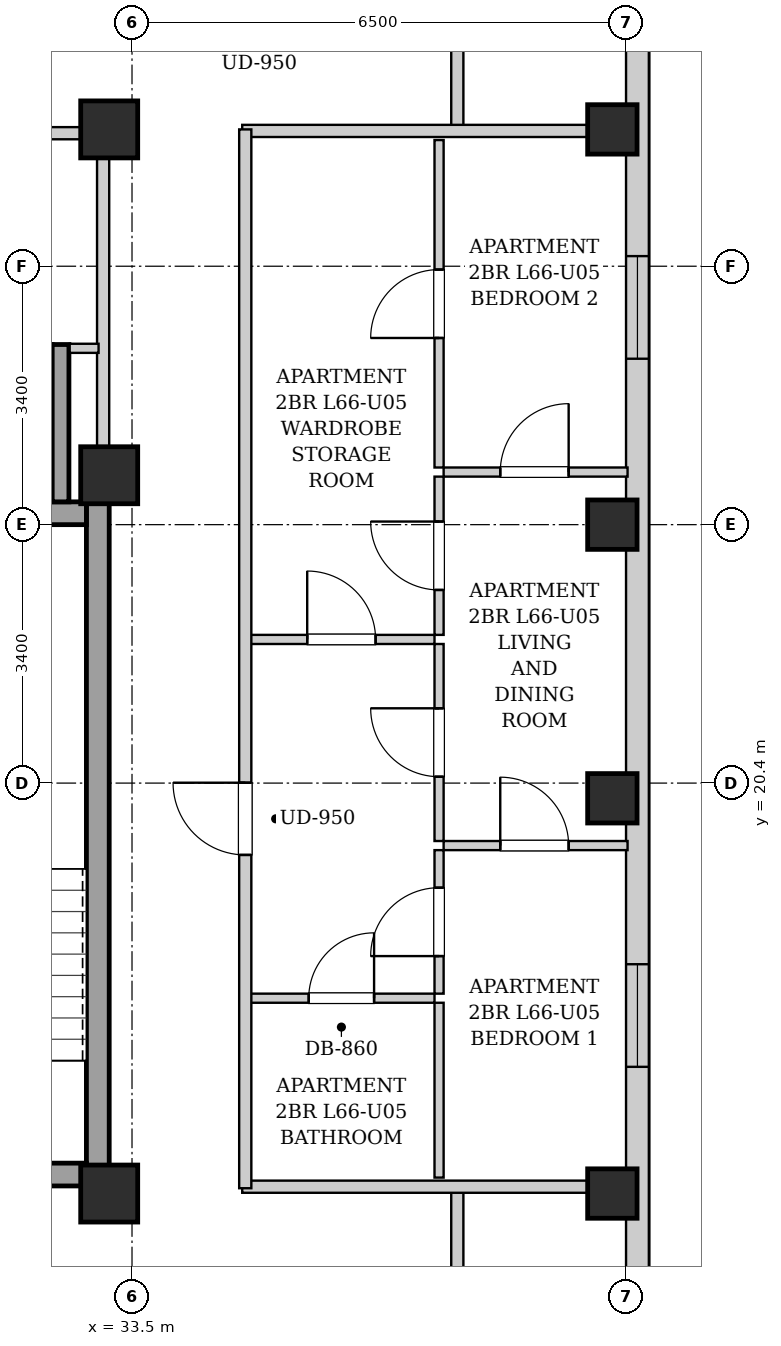
"""IFC4 building model, lengths in metres.
Left out: names, types, materials, properties, quantities, classifications, styles, units other than length and angle.
Written with IfcOpenShell. Run it as: python <this file> out.ifc"""

import sys

from ifc_helpers import new_model, si_unit, direction, frame, frame_2d, origin, origin_2d, place, context, subcontext, project, spatial, rectangle, extrude, element, fill, save


model = new_model("IFC4")
c1 = context("Model", 3, precision=1e-05, world=origin(), true_north=direction((0.0, 1.0)))
c2 = subcontext(c1, "Body", "Model", "MODEL_VIEW")
j1 = project(units=[si_unit("LENGTHUNIT", "METRE"), si_unit("PLANEANGLEUNIT", "RADIAN")], contexts=[c1])
p1 = place(None, origin())
s1 = spatial("IfcSite", under=j1, at=p1, CompositionType="ELEMENT")
p2 = place(p1, origin())
s2 = spatial("IfcBuilding", under=s1, at=p2, CompositionType="ELEMENT")
p3 = place(p2, frame((0.0, 0.0, 227.5)))
s3 = spatial("IfcBuildingStorey", under=s2, at=p3, CompositionType="ELEMENT", Elevation=227.5)
for number, where, z_axis, x_axis in (
    (1, (39.82, 15.0, 0.0), (0.0, 0.0, 1.0), (1.0, 0.0, 0.0)),
    (2, (39.82, 20.2, 0.0), (0.0, 0.0, 1.0), (1.0, 0.0, 0.0)),
    (3, (39.82, 23.8, 0.0), (0.0, 0.0, 1.0), (1.0, 0.0, 0.0)),
    (4, (39.82, 29.0, 0.0), (0.0, 0.0, 1.0), (1.0, 0.0, 0.0)),
):
    element("IfcColumn", number, at=place(p3, frame(where, z_axis=z_axis, x_axis=x_axis)), inside=s3, PredefinedType="COLUMN", context=c2, shape_type="SweptSolid", body=[
        extrude(rectangle(XDim=0.65, YDim=0.65, at=origin_2d()), origin(), (0.0, 0.0, 1.0), 3.4),
    ])
for number, where, z_axis, x_axis in (
    (5, (33.2, 15.0, 0.0), (0.0, 0.0, 1.0), (1.0, 0.0, 0.0)),
    (6, (33.2, 29.0, 0.0), (0.0, 0.0, 1.0), (1.0, 0.0, 0.0)),
    (7, (33.2, 24.45, 0.0), (0.0, 0.0, 1.0), (1.0, 0.0, 0.0)),
):
    element("IfcColumn", number, at=place(p3, frame(where, z_axis=z_axis, x_axis=x_axis)), inside=s3, PredefinedType="COLUMN", context=c2, shape_type="SweptSolid", body=[
        extrude(rectangle(XDim=0.75, YDim=0.75, at=origin_2d()), origin(), (0.0, 0.0, 1.0), 3.4),
    ])
p4 = place(p3, frame((40.15, 37.7, 0.0), z_axis=(0.0, 0.0, 1.0), x_axis=(0.0, -1.0, 0.0)))
e8 = element("IfcWall", 8, at=p4, inside=s3, PredefinedType="SOLIDWALL", context=c2, shape_type="SweptSolid", body=[
    extrude(rectangle(XDim=31.4, YDim=0.3, at=frame_2d((15.7, 0.0))), origin(), (0.0, 0.0, 1.0), 3.14),
])
p5 = place(p4, frame((28.396, 0.0, 0.55)))
e9 = element("IfcOpeningElement", 9, at=p5, cuts=e8, PredefinedType="OPENING", context=c2, shape_type="SweptSolid", body=[
    extrude(rectangle(XDim=1.35, YDim=1.2, at=frame_2d((0.675, 0.6))), frame((0.0, 0.16, 0.0), z_axis=(0.0, -1.0, 0.0), x_axis=(1.0, 0.0, 0.0)), (0.0, 0.0, 1.0), 0.32),
])
p6 = place(p4, frame((1.653, 0.0, 0.55)))
e10 = element("IfcOpeningElement", 10, at=p6, cuts=e8, PredefinedType="OPENING", context=c2, shape_type="SweptSolid", body=[
    extrude(rectangle(XDim=1.35, YDim=1.2, at=frame_2d((0.675, 0.6))), frame((0.0, 0.16, 0.0), z_axis=(0.0, -1.0, 0.0), x_axis=(1.0, 0.0, 0.0)), (0.0, 0.0, 1.0), 0.32),
])
p7 = place(p4, frame((19.683, 0.0, 0.55)))
e11 = element("IfcOpeningElement", 11, at=p7, cuts=e8, PredefinedType="OPENING", context=c2, shape_type="SweptSolid", body=[
    extrude(rectangle(XDim=1.35, YDim=1.2, at=frame_2d((0.675, 0.6))), frame((0.0, 0.16, 0.0), z_axis=(0.0, -1.0, 0.0), x_axis=(1.0, 0.0, 0.0)), (0.0, 0.0, 1.0), 0.32),
])
p8 = place(p4, frame((10.367, 0.0, 0.55)))
e12 = element("IfcOpeningElement", 12, at=p8, cuts=e8, PredefinedType="OPENING", context=c2, shape_type="SweptSolid", body=[
    extrude(rectangle(XDim=1.35, YDim=1.2, at=frame_2d((0.675, 0.6))), frame((0.0, 0.16, 0.0), z_axis=(0.0, -1.0, 0.0), x_axis=(1.0, 0.0, 0.0)), (0.0, 0.0, 1.0), 0.32),
])
p9 = place(p3, frame((33.05, 15.1, 0.0), z_axis=(0.0, 0.0, 1.0), x_axis=(0.0, 1.0, 0.0)))
e13 = element("IfcWall", 13, at=p9, inside=s3, PredefinedType="SHEAR", context=c2, shape_type="SweptSolid", body=[
    extrude(rectangle(XDim=9.0, YDim=0.3, at=frame_2d((4.5, 0.0))), origin(), (0.0, 0.0, 1.0), 3.14),
])
p10 = place(p3, frame((30.05, 23.95, 0.0), z_axis=(0.0, 0.0, 1.0), x_axis=(1.0, 0.0, 0.0)))
e14 = element("IfcWall", 14, at=p10, inside=s3, PredefinedType="SHEAR", context=c2, shape_type="SweptSolid", body=[
    extrude(rectangle(XDim=2.85, YDim=0.3, at=frame_2d((1.425, 0.0))), origin(), (0.0, 0.0, 1.0), 3.14),
])
p11 = place(p3, frame((30.05, 15.25, 0.0), z_axis=(0.0, 0.0, 1.0), x_axis=(1.0, 0.0, 0.0)))
e15 = element("IfcWall", 15, at=p11, inside=s3, PredefinedType="SHEAR", context=c2, shape_type="SweptSolid", body=[
    extrude(rectangle(XDim=2.85, YDim=0.3, at=frame_2d((1.425, 0.0))), origin(), (0.0, 0.0, 1.0), 3.14),
])
p12 = place(p11, frame((0.86, 0.0, 0.0)))
e16 = element("IfcOpeningElement", 16, at=p12, cuts=e15, PredefinedType="OPENING", context=c2, shape_type="SweptSolid", body=[
    extrude(rectangle(XDim=1.1, YDim=2.05, at=frame_2d((0.55, 1.025))), frame((0.0, 0.16, 0.0), z_axis=(0.0, -1.0, 0.0), x_axis=(1.0, 0.0, 0.0)), (0.0, 0.0, 1.0), 0.32),
])
p13 = place(p3, frame((32.56, 24.1, 0.0), z_axis=(0.0, 0.0, 1.0), x_axis=(0.0, 1.0, 0.0)))
e17 = element("IfcWall", 17, at=p13, inside=s3, PredefinedType="SHEAR", context=c2, shape_type="SweptSolid", body=[
    extrude(rectangle(XDim=2.07, YDim=0.22, at=frame_2d((1.035, 0.0))), origin(), (0.0, 0.0, 1.0), 3.14),
])
p14 = place(p3, frame((33.12, 24.12, 0.0), z_axis=(0.0, 0.0, 1.0), x_axis=(0.0, 1.0, 0.0)))
e18 = element("IfcWall", 18, at=p14, inside=s3, PredefinedType="PARTITIONING", context=c2, shape_type="SweptSolid", body=[
    extrude(rectangle(XDim=4.76, YDim=0.16, at=frame_2d((2.38, 0.0))), origin(), (0.0, 0.0, 1.0), 2.475),
])
p15 = place(p3, frame((32.68, 26.12, 0.0), z_axis=(0.0, 0.0, 1.0), x_axis=(1.0, 0.0, 0.0)))
e19 = element("IfcWall", 19, at=p15, inside=s3, PredefinedType="PARTITIONING", context=c2, shape_type="SweptSolid", body=[
    extrude(rectangle(XDim=0.38, YDim=0.12, at=frame_2d((0.19, 0.0))), origin(), (0.0, 0.0, 1.0), 3.14),
])
p16 = place(p3, frame((30.08, 28.95, 0.0), z_axis=(0.0, 0.0, 1.0), x_axis=(1.0, 0.0, 0.0)))
e20 = element("IfcWall", 20, at=p16, inside=s3, PredefinedType="PARTITIONING", context=c2, shape_type="SweptSolid", body=[
    extrude(rectangle(XDim=2.96, YDim=0.16, at=frame_2d((1.48, 0.0))), origin(), (0.0, 0.0, 1.0), 3.14),
])
p17 = place(p16, frame((1.045, 0.0, 0.0)))
e21 = element("IfcOpeningElement", 21, at=p17, cuts=e20, PredefinedType="OPENING", context=c2, shape_type="SweptSolid", body=[
    extrude(rectangle(XDim=0.86, YDim=2.05, at=frame_2d((0.43, 1.025))), frame((0.0, 0.09, 0.0), z_axis=(0.0, -1.0, 0.0), x_axis=(1.0, 0.0, 0.0)), (0.0, 0.0, 1.0), 0.18),
])
for number, where, z_axis, x_axis in (
    (22, (37.78, 13.51, 0.0), (0.0, 0.0, 1.0), (0.0, 1.0, 0.0)),
    (23, (37.78, 28.98, 0.0), (0.0, 0.0, 1.0), (0.0, 1.0, 0.0)),
):
    element("IfcWall", number, at=place(p3, frame(where, z_axis=z_axis, x_axis=x_axis)), inside=s3, PredefinedType="PARTITIONING", context=c2, shape_type="SweptSolid", body=[
        extrude(rectangle(XDim=1.58, YDim=0.16, at=frame_2d((0.79, 0.0))), origin(), (0.0, 0.0, 1.0), 3.14),
    ])
for number, where, z_axis, x_axis in (
    (24, (34.95, 15.09, 0.0), (0.0, 0.0, 1.0), (1.0, 0.0, 0.0)),
    (25, (34.95, 28.98, 0.0), (0.0, 0.0, 1.0), (1.0, 0.0, 0.0)),
):
    element("IfcWall", number, at=place(p3, frame(where, z_axis=z_axis, x_axis=x_axis)), inside=s3, PredefinedType="PARTITIONING", context=c2, shape_type="SweptSolid", body=[
        extrude(rectangle(XDim=5.07, YDim=0.16, at=frame_2d((2.535, 0.0))), origin(), (0.0, 0.0, 1.0), 2.668),
    ])
p18 = place(p3, frame((35.03, 22.29, 0.0), z_axis=(0.0, 0.0, 1.0), x_axis=(1.0, 0.0, 0.0)))
e26 = element("IfcWall", 26, at=p18, inside=s3, PredefinedType="PARTITIONING", context=c2, shape_type="SweptSolid", body=[
    extrude(rectangle(XDim=2.45, YDim=0.12, at=frame_2d((1.225, 0.0))), origin(), (0.0, 0.0, 1.0), 3.14),
])
p19 = place(p18, frame((0.775, 0.0, 0.0)))
e27 = element("IfcOpeningElement", 27, at=p19, cuts=e26, PredefinedType="OPENING", context=c2, shape_type="SweptSolid", body=[
    extrude(rectangle(XDim=0.9, YDim=2.05, at=frame_2d((0.45, 1.025))), frame((0.0, 0.07, 0.0), z_axis=(0.0, -1.0, 0.0), x_axis=(1.0, 0.0, 0.0)), (0.0, 0.0, 1.0), 0.14),
])
p20 = place(p3, frame((37.54, 22.35, 0.0), z_axis=(0.0, 0.0, 1.0), x_axis=(0.0, 1.0, 0.0)))
e28 = element("IfcWall", 28, at=p20, inside=s3, PredefinedType="PARTITIONING", context=c2, shape_type="SweptSolid", body=[
    extrude(rectangle(XDim=2.082, YDim=0.12, at=frame_2d((1.041, 0.0))), origin(), (0.0, 0.0, 1.0), 3.14),
])
p21 = place(p20, frame((0.591, 0.0, 0.0)))
e29 = element("IfcOpeningElement", 29, at=p21, cuts=e28, PredefinedType="OPENING", context=c2, shape_type="SweptSolid", body=[
    extrude(rectangle(XDim=0.9, YDim=2.05, at=frame_2d((0.45, 1.025))), frame((0.0, 0.07, 0.0), z_axis=(0.0, -1.0, 0.0), x_axis=(1.0, 0.0, 0.0)), (0.0, 0.0, 1.0), 0.14),
])
p22 = place(p3, frame((37.54, 24.552, 0.0), z_axis=(0.0, 0.0, 1.0), x_axis=(0.0, 1.0, 0.0)))
e30 = element("IfcWall", 30, at=p22, inside=s3, PredefinedType="PARTITIONING", context=c2, shape_type="SweptSolid", body=[
    extrude(rectangle(XDim=4.308, YDim=0.12, at=frame_2d((2.154, 0.0))), origin(), (0.0, 0.0, 1.0), 3.14),
])
p23 = place(p22, frame((1.704, 0.0, 0.0)))
e31 = element("IfcOpeningElement", 31, at=p23, cuts=e30, PredefinedType="OPENING", context=c2, shape_type="SweptSolid", body=[
    extrude(rectangle(XDim=0.9, YDim=2.05, at=frame_2d((0.45, 1.025))), frame((0.0, 0.07, 0.0), z_axis=(0.0, -1.0, 0.0), x_axis=(1.0, 0.0, 0.0)), (0.0, 0.0, 1.0), 0.14),
])
p24 = place(p3, frame((35.03, 17.57, 0.0), z_axis=(0.0, 0.0, 1.0), x_axis=(1.0, 0.0, 0.0)))
e32 = element("IfcWall", 32, at=p24, inside=s3, PredefinedType="PARTITIONING", context=c2, shape_type="SweptSolid", body=[
    extrude(rectangle(XDim=2.45, YDim=0.12, at=frame_2d((1.225, 0.0))), origin(), (0.0, 0.0, 1.0), 3.14),
])
p25 = place(p24, frame((0.795, 0.0, 0.0)))
e33 = element("IfcOpeningElement", 33, at=p25, cuts=e32, PredefinedType="OPENING", context=c2, shape_type="SweptSolid", body=[
    extrude(rectangle(XDim=0.86, YDim=2.05, at=frame_2d((0.43, 1.025))), frame((0.0, 0.07, 0.0), z_axis=(0.0, -1.0, 0.0), x_axis=(1.0, 0.0, 0.0)), (0.0, 0.0, 1.0), 0.14),
])
p26 = place(p3, frame((37.54, 15.21, 0.0), z_axis=(0.0, 0.0, 1.0), x_axis=(0.0, 1.0, 0.0)))
e34 = element("IfcWall", 34, at=p26, inside=s3, PredefinedType="PARTITIONING", context=c2, shape_type="SweptSolid", body=[
    extrude(rectangle(XDim=2.3, YDim=0.12, at=frame_2d((1.15, 0.0))), origin(), (0.0, 0.0, 1.0), 3.14),
])
p27 = place(p3, frame((37.54, 17.63, 0.0), z_axis=(0.0, 0.0, 1.0), x_axis=(0.0, 1.0, 0.0)))
e35 = element("IfcWall", 35, at=p27, inside=s3, PredefinedType="PARTITIONING", context=c2, shape_type="SweptSolid", body=[
    extrude(rectangle(XDim=1.888, YDim=0.12, at=frame_2d((0.944, 0.0))), origin(), (0.0, 0.0, 1.0), 3.14),
])
p28 = place(p27, frame((0.494, 0.0, 0.0)))
e36 = element("IfcOpeningElement", 36, at=p28, cuts=e35, PredefinedType="OPENING", context=c2, shape_type="SweptSolid", body=[
    extrude(rectangle(XDim=0.9, YDim=2.05, at=frame_2d((0.45, 1.025))), frame((0.0, 0.07, 0.0), z_axis=(0.0, -1.0, 0.0), x_axis=(1.0, 0.0, 0.0)), (0.0, 0.0, 1.0), 0.14),
])
p29 = place(p3, frame((37.54, 19.638, 0.0), z_axis=(0.0, 0.0, 1.0), x_axis=(0.0, 1.0, 0.0)))
e37 = element("IfcWall", 37, at=p29, inside=s3, PredefinedType="PARTITIONING", context=c2, shape_type="SweptSolid", body=[
    extrude(rectangle(XDim=2.592, YDim=0.12, at=frame_2d((1.296, 0.0))), origin(), (0.0, 0.0, 1.0), 3.14),
])
p30 = place(p29, frame((0.846, 0.0, 0.0)))
e38 = element("IfcOpeningElement", 38, at=p30, cuts=e37, PredefinedType="OPENING", context=c2, shape_type="SweptSolid", body=[
    extrude(rectangle(XDim=0.9, YDim=2.05, at=frame_2d((0.45, 1.025))), frame((0.0, 0.07, 0.0), z_axis=(0.0, -1.0, 0.0), x_axis=(1.0, 0.0, 0.0)), (0.0, 0.0, 1.0), 0.14),
])
p31 = place(p3, frame((37.6, 19.578, 0.0), z_axis=(0.0, 0.0, 1.0), x_axis=(1.0, 0.0, 0.0)))
e39 = element("IfcWall", 39, at=p31, inside=s3, PredefinedType="PARTITIONING", context=c2, shape_type="SweptSolid", body=[
    extrude(rectangle(XDim=2.42, YDim=0.12, at=frame_2d((1.21, 0.0))), origin(), (0.0, 0.0, 1.0), 3.14),
])
p32 = place(p31, frame((0.745, 0.0, 0.0)))
e40 = element("IfcOpeningElement", 40, at=p32, cuts=e39, PredefinedType="OPENING", context=c2, shape_type="SweptSolid", body=[
    extrude(rectangle(XDim=0.9, YDim=2.05, at=frame_2d((0.45, 1.025))), frame((0.0, 0.07, 0.0), z_axis=(0.0, -1.0, 0.0), x_axis=(1.0, 0.0, 0.0)), (0.0, 0.0, 1.0), 0.14),
])
p33 = place(p3, frame((37.6, 24.492, 0.0), z_axis=(0.0, 0.0, 1.0), x_axis=(1.0, 0.0, 0.0)))
e41 = element("IfcWall", 41, at=p33, inside=s3, PredefinedType="PARTITIONING", context=c2, shape_type="SweptSolid", body=[
    extrude(rectangle(XDim=2.42, YDim=0.12, at=frame_2d((1.21, 0.0))), origin(), (0.0, 0.0, 1.0), 2.878),
])
p34 = place(p33, frame((0.745, 0.0, 0.0)))
e42 = element("IfcOpeningElement", 42, at=p34, cuts=e41, PredefinedType="OPENING", context=c2, shape_type="SweptSolid", body=[
    extrude(rectangle(XDim=0.9, YDim=2.05, at=frame_2d((0.45, 1.025))), frame((0.0, 0.07, 0.0), z_axis=(0.0, -1.0, 0.0), x_axis=(1.0, 0.0, 0.0)), (0.0, 0.0, 1.0), 0.14),
])
p35 = place(p3, frame((34.99, 15.07, 0.0), z_axis=(0.0, 0.0, 1.0), x_axis=(0.0, 1.0, 0.0)))
e43 = element("IfcWall", 43, at=p35, inside=s3, PredefinedType="PARTITIONING", context=c2, shape_type="SweptSolid", body=[
    extrude(rectangle(XDim=13.93, YDim=0.16, at=frame_2d((6.965, 0.0))), origin(), (0.0, 0.0, 1.0), 3.14),
])
p36 = place(p35, frame((4.385, 0.0, 0.0)))
e44 = element("IfcOpeningElement", 44, at=p36, cuts=e43, PredefinedType="OPENING", context=c2, shape_type="SweptSolid", body=[
    extrude(rectangle(XDim=0.95, YDim=2.1, at=frame_2d((0.475, 1.05))), frame((0.0, 0.09, 0.0), z_axis=(0.0, -1.0, 0.0), x_axis=(1.0, 0.0, 0.0)), (0.0, 0.0, 1.0), 0.18),
])
p37 = place(p19, origin())
e45 = element("IfcDoor", 45, at=p37, inside=s3, OperationType="SINGLE_SWING_LEFT", PredefinedType="DOOR", context=c2, shape_type="SweptSolid", body=[
    extrude(rectangle(XDim=0.9, YDim=2.05, at=frame_2d((0.45, 1.025))), frame((0.0, 0.025, 0.0), z_axis=(0.0, -1.0, 0.0), x_axis=(1.0, 0.0, 0.0)), (0.0, 0.0, 1.0), 0.05),
])
fill(e27, e45)
p38 = place(p21, origin())
e46 = element("IfcDoor", 46, at=p38, inside=s3, OperationType="SINGLE_SWING_RIGHT", PredefinedType="DOOR", context=c2, shape_type="SweptSolid", body=[
    extrude(rectangle(XDim=0.9, YDim=2.05, at=frame_2d((0.45, 1.025))), frame((0.0, 0.025, 0.0), z_axis=(0.0, -1.0, 0.0), x_axis=(1.0, 0.0, 0.0)), (0.0, 0.0, 1.0), 0.05),
])
fill(e29, e46)
p39 = place(p23, origin())
e47 = element("IfcDoor", 47, at=p39, inside=s3, OperationType="SINGLE_SWING_LEFT", PredefinedType="DOOR", context=c2, shape_type="SweptSolid", body=[
    extrude(rectangle(XDim=0.9, YDim=2.05, at=frame_2d((0.45, 1.025))), frame((0.0, 0.025, 0.0), z_axis=(0.0, -1.0, 0.0), x_axis=(1.0, 0.0, 0.0)), (0.0, 0.0, 1.0), 0.05),
])
fill(e31, e47)
p40 = place(p25, origin())
e48 = element("IfcDoor", 48, at=p40, inside=s3, OperationType="SINGLE_SWING_RIGHT", PredefinedType="DOOR", context=c2, shape_type="SweptSolid", body=[
    extrude(rectangle(XDim=0.86, YDim=2.05, at=frame_2d((0.43, 1.025))), frame((0.0, 0.025, 0.0), z_axis=(0.0, -1.0, 0.0), x_axis=(1.0, 0.0, 0.0)), (0.0, 0.0, 1.0), 0.05),
])
fill(e33, e48)
p41 = place(p28, origin())
e49 = element("IfcDoor", 49, at=p41, inside=s3, OperationType="SINGLE_SWING_LEFT", PredefinedType="DOOR", context=c2, shape_type="SweptSolid", body=[
    extrude(rectangle(XDim=0.9, YDim=2.05, at=frame_2d((0.45, 1.025))), frame((0.0, 0.025, 0.0), z_axis=(0.0, -1.0, 0.0), x_axis=(1.0, 0.0, 0.0)), (0.0, 0.0, 1.0), 0.05),
])
fill(e36, e49)
p42 = place(p30, origin())
e50 = element("IfcDoor", 50, at=p42, inside=s3, OperationType="SINGLE_SWING_RIGHT", PredefinedType="DOOR", context=c2, shape_type="SweptSolid", body=[
    extrude(rectangle(XDim=0.9, YDim=2.05, at=frame_2d((0.45, 1.025))), frame((0.0, 0.025, 0.0), z_axis=(0.0, -1.0, 0.0), x_axis=(1.0, 0.0, 0.0)), (0.0, 0.0, 1.0), 0.05),
])
fill(e38, e50)
p43 = place(p32, origin())
e51 = element("IfcDoor", 51, at=p43, inside=s3, OperationType="SINGLE_SWING_LEFT", PredefinedType="DOOR", context=c2, shape_type="SweptSolid", body=[
    extrude(rectangle(XDim=0.9, YDim=2.05, at=frame_2d((0.45, 1.025))), frame((0.0, 0.025, 0.0), z_axis=(0.0, -1.0, 0.0), x_axis=(1.0, 0.0, 0.0)), (0.0, 0.0, 1.0), 0.05),
])
fill(e40, e51)
p44 = place(p34, origin())
e52 = element("IfcDoor", 52, at=p44, inside=s3, OperationType="SINGLE_SWING_RIGHT", PredefinedType="DOOR", context=c2, shape_type="SweptSolid", body=[
    extrude(rectangle(XDim=0.9, YDim=2.05, at=frame_2d((0.45, 1.025))), frame((0.0, 0.025, 0.0), z_axis=(0.0, -1.0, 0.0), x_axis=(1.0, 0.0, 0.0)), (0.0, 0.0, 1.0), 0.05),
])
fill(e42, e52)
p45 = place(p36, origin())
e53 = element("IfcDoor", 53, at=p45, inside=s3, OperationType="SINGLE_SWING_RIGHT", PredefinedType="DOOR", context=c2, shape_type="SweptSolid", body=[
    extrude(rectangle(XDim=0.95, YDim=2.1, at=frame_2d((0.475, 1.05))), frame((0.0, 0.025, 0.0), z_axis=(0.0, -1.0, 0.0), x_axis=(1.0, 0.0, 0.0)), (0.0, 0.0, 1.0), 0.05),
])
fill(e44, e53)
p46 = place(p7, origin())
e54 = element("IfcWindow", 54, at=p46, inside=s3, PartitioningType="SINGLE_PANEL", PredefinedType="WINDOW", context=c2, shape_type="SweptSolid", body=[
    extrude(rectangle(XDim=1.35, YDim=1.2, at=frame_2d((0.675, 0.6))), frame((0.0, 0.03, 0.0), z_axis=(0.0, -1.0, 0.0), x_axis=(1.0, 0.0, 0.0)), (0.0, 0.0, 1.0), 0.06),
])
fill(e11, e54)
p47 = place(p8, origin())
e55 = element("IfcWindow", 55, at=p47, inside=s3, PartitioningType="SINGLE_PANEL", PredefinedType="WINDOW", context=c2, shape_type="SweptSolid", body=[
    extrude(rectangle(XDim=1.35, YDim=1.2, at=frame_2d((0.675, 0.6))), frame((0.0, 0.03, 0.0), z_axis=(0.0, -1.0, 0.0), x_axis=(1.0, 0.0, 0.0)), (0.0, 0.0, 1.0), 0.06),
])
fill(e12, e55)
save(model, sys.argv[1])
